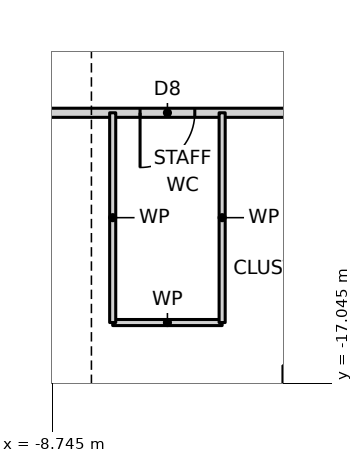
"""IFC4 building model, lengths in metres.
Left out: names, types, materials, properties, quantities, classifications, styles, units other than length and angle.
Written with IfcOpenShell. Run it as: python <this file> out.ifc"""

import sys

from ifc_helpers import new_model, si_unit, direction, frame, frame_2d, origin, place, context, subcontext, project, spatial, rectangle, extrude, element, fill, save


model = new_model("IFC4")
c1 = context("Model", 3, precision=1e-05, world=origin(), true_north=direction((0.0, 1.0)))
c2 = subcontext(c1, "Body", "Model", "MODEL_VIEW")
j1 = project(units=[si_unit("LENGTHUNIT", "METRE"), si_unit("PLANEANGLEUNIT", "RADIAN")], contexts=[c1])
p1 = place(None, origin())
s1 = spatial("IfcSite", under=j1, at=p1, CompositionType="ELEMENT")
p2 = place(p1, origin())
s2 = spatial("IfcBuilding", under=s1, at=p2, CompositionType="ELEMENT")
p3 = place(p2, frame((0.0, 0.0, 18.5)))
s3 = spatial("IfcBuildingStorey", under=s2, at=p3, CompositionType="ELEMENT", Elevation=18.5)
p4 = place(p3, frame((-7.75, -16.05, 0.0), z_axis=(0.0, 0.0, 1.0), x_axis=(1.0, 0.0, 0.0)))
e1 = element("IfcWall", 1, at=p4, inside=s3, PredefinedType="PARTITIONING", context=c2, shape_type="SweptSolid", body=[
    extrude(rectangle(XDim=1.8, YDim=0.1, at=frame_2d((0.9, 0.0))), origin(), (0.0, 0.0, 1.0), 3.27),
])
p5 = place(p3, frame((-12.6, -12.6, 0.0), z_axis=(0.0, 0.0, 1.0), x_axis=(1.0, 0.0, 0.0)))
e2 = element("IfcWall", 2, at=p5, inside=s3, PredefinedType="PARTITIONING", context=c2, shape_type="SweptSolid", body=[
    extrude(rectangle(XDim=25.2, YDim=0.15, at=frame_2d((12.6, 0.0))), origin(), (0.0, 0.0, 1.0), 3.27),
])
p6 = place(p5, frame((8.05, 0.0, 0.0)))
e3 = element("IfcOpeningElement", 3, at=p6, cuts=e2, PredefinedType="OPENING", context=c2, shape_type="SweptSolid", body=[
    extrude(rectangle(XDim=1.0, YDim=2.1, at=frame_2d((0.5, 1.05))), frame((0.0, 0.085, 0.0), z_axis=(0.0, -1.0, 0.0), x_axis=(1.0, 0.0, 0.0)), (0.0, 0.0, 1.0), 0.17),
])
p7 = place(p5, frame((5.3, 0.0, 0.0)))
e4 = element("IfcOpeningElement", 4, at=p7, cuts=e2, PredefinedType="OPENING", context=c2, shape_type="SweptSolid", body=[
    extrude(rectangle(XDim=0.9, YDim=2.1, at=frame_2d((0.45, 1.05))), frame((0.0, 0.085, 0.0), z_axis=(0.0, -1.0, 0.0), x_axis=(1.0, 0.0, 0.0)), (0.0, 0.0, 1.0), 0.17),
])
for number, where, z_axis, x_axis in (
    (5, (-5.95, -16.05, 0.0), (0.0, 0.0, 1.0), (0.0, 1.0, 0.0)),
    (6, (-7.75, -16.05, 0.0), (0.0, 0.0, 1.0), (0.0, 1.0, 0.0)),
):
    element("IfcWall", number, at=place(p3, frame(where, z_axis=z_axis, x_axis=x_axis)), inside=s3, PredefinedType="PARTITIONING", context=c2, shape_type="SweptSolid", body=[
        extrude(rectangle(XDim=3.45, YDim=0.1, at=frame_2d((1.725, 0.0))), origin(), (0.0, 0.0, 1.0), 3.27),
    ])
p8 = place(p7, frame((0.9, 0.0, 0.0), z_axis=(0.0, 0.0, 1.0), x_axis=(-1.0, 0.0, 0.0)))
e7 = element("IfcDoor", 7, at=p8, inside=s3, OperationType="SINGLE_SWING_RIGHT", PredefinedType="DOOR", context=c2, shape_type="SweptSolid", body=[
    extrude(rectangle(XDim=0.9, YDim=2.1, at=frame_2d((0.45, 1.05))), frame((0.0, 0.025, 0.0), z_axis=(0.0, -1.0, 0.0), x_axis=(1.0, 0.0, 0.0)), (0.0, 0.0, 1.0), 0.05),
])
fill(e4, e7)
save(model, sys.argv[1])
